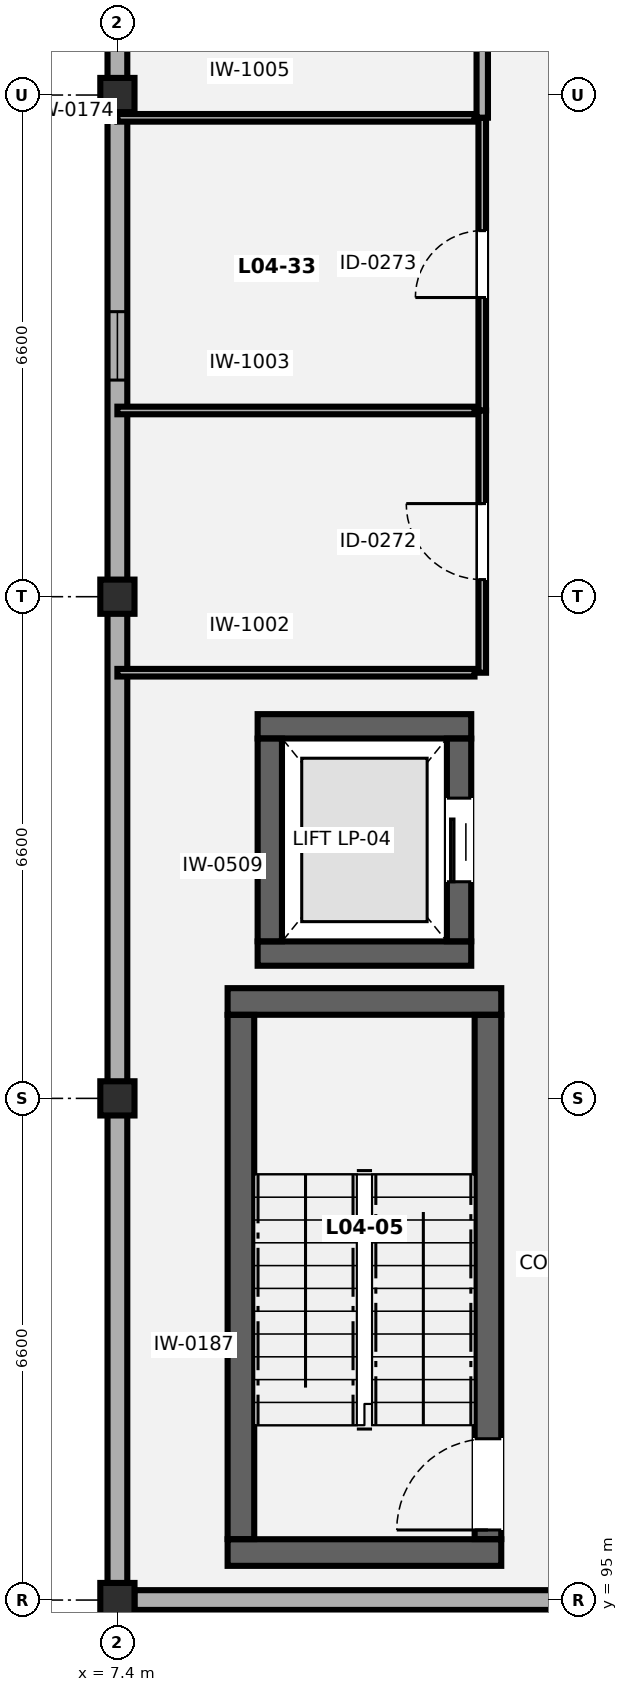
"""IFC4 building model, lengths in metres.
Left out: names, types, materials, properties, quantities, classifications, styles, units other than length and angle.
Written with IfcOpenShell. Run it as: python <this file> out.ifc"""

import sys

from ifc_helpers import new_model, si_unit, direction, frame, frame_2d, origin, origin_2d, place, context, subcontext, project, spatial, rectangle, extrude, element, fill, save


model = new_model("IFC4")
c1 = context("Model", 3, precision=1e-05, world=origin(), true_north=direction((0.0, 1.0)))
c2 = subcontext(c1, "Body", "Model", "MODEL_VIEW")
j1 = project(units=[si_unit("LENGTHUNIT", "METRE"), si_unit("PLANEANGLEUNIT", "RADIAN")], contexts=[c1])
p1 = place(None, origin())
s1 = spatial("IfcSite", under=j1, at=p1, CompositionType="ELEMENT")
p2 = place(p1, origin())
s2 = spatial("IfcBuilding", under=s1, at=p2, CompositionType="ELEMENT")
p3 = place(p2, frame((0.0, 0.0, 17.5)))
s3 = spatial("IfcBuildingStorey", under=s2, at=p3, CompositionType="ELEMENT", Elevation=17.5)
for number, where, z_axis, x_axis in (
    (1, (7.4, 95.0, 0.0), (0.0, 0.0, 1.0), (1.0, 0.0, 0.0)),
    (2, (7.4, 101.6, 0.0), (0.0, 0.0, 1.0), (1.0, 0.0, 0.0)),
    (3, (7.4, 108.2, 0.0), (0.0, 0.0, 1.0), (1.0, 0.0, 0.0)),
    (4, (7.4, 114.8, 0.0), (0.0, 0.0, 1.0), (1.0, 0.0, 0.0)),
):
    element("IfcColumn", number, at=place(p3, frame(where, z_axis=z_axis, x_axis=x_axis)), inside=s3, PredefinedType="PILASTER", context=c2, shape_type="SweptSolid", body=[
        extrude(rectangle(XDim=0.45, YDim=0.45, at=origin_2d()), origin(), (0.0, 0.0, 1.0), 4.2),
    ])
p4 = place(p3, frame((7.4, 95.223, 0.0), z_axis=(0.0, 0.0, 1.0), x_axis=(0.0, 1.0, 0.0)))
e5 = element("IfcWall", 5, at=p4, inside=s3, PredefinedType="SOLIDWALL", context=c2, shape_type="SweptSolid", body=[
    extrude(rectangle(XDim=52.354, YDim=0.26, at=frame_2d((26.177, 0.0))), origin(), (0.0, 0.0, 1.0), 2.885),
])
p5 = place(p4, frame((15.827, 0.0, 0.85)))
e6 = element("IfcOpeningElement", 6, at=p5, cuts=e5, PredefinedType="OPENING", context=c2, shape_type="SweptSolid", body=[
    extrude(rectangle(XDim=0.9, YDim=1.35, at=frame_2d((0.45, 0.675))), frame((0.0, 0.14, 0.0), z_axis=(0.0, -1.0, 0.0), x_axis=(1.0, 0.0, 0.0)), (0.0, 0.0, 1.0), 0.28),
])
p6 = place(p4, frame((29.027, 0.0, 0.85)))
e7 = element("IfcOpeningElement", 7, at=p6, cuts=e5, PredefinedType="OPENING", context=c2, shape_type="SweptSolid", body=[
    extrude(rectangle(XDim=0.9, YDim=1.35, at=frame_2d((0.45, 0.675))), frame((0.0, 0.14, 0.0), z_axis=(0.0, -1.0, 0.0), x_axis=(1.0, 0.0, 0.0)), (0.0, 0.0, 1.0), 0.28),
])
p7 = place(p4, frame((42.227, 0.0, 0.85)))
e8 = element("IfcOpeningElement", 8, at=p7, cuts=e5, PredefinedType="OPENING", context=c2, shape_type="SweptSolid", body=[
    extrude(rectangle(XDim=0.9, YDim=1.35, at=frame_2d((0.45, 0.675))), frame((0.0, 0.14, 0.0), z_axis=(0.0, -1.0, 0.0), x_axis=(1.0, 0.0, 0.0)), (0.0, 0.0, 1.0), 0.28),
])
p8 = place(p3, frame((26.977, 95.0, 0.0), z_axis=(0.0, 0.0, 1.0), x_axis=(-1.0, 0.0, 0.0)))
e9 = element("IfcWall", 9, at=p8, inside=s3, PredefinedType="SOLIDWALL", context=c2, shape_type="SweptSolid", body=[
    extrude(rectangle(XDim=19.354, YDim=0.26, at=frame_2d((9.677, 0.0))), origin(), (0.0, 0.0, 1.0), 2.48),
])
p9 = place(p8, frame((1.577, 0.0, 0.85)))
e10 = element("IfcOpeningElement", 10, at=p9, cuts=e9, PredefinedType="OPENING", context=c2, shape_type="SweptSolid", body=[
    extrude(rectangle(XDim=1.7, YDim=1.4, at=frame_2d((0.85, 0.7))), frame((0.0, 0.14, 0.0), z_axis=(0.0, -1.0, 0.0), x_axis=(1.0, 0.0, 0.0)), (0.0, 0.0, 1.0), 0.28),
])
for number, where, z_axis, x_axis in (
    (11, (8.85, 95.625, 0.0), (0.0, 0.0, 1.0), (1.0, 0.0, 0.0)),
    (12, (8.85, 102.875, 0.0), (0.0, 0.0, 1.0), (1.0, 0.0, 0.0)),
):
    element("IfcWall", number, at=place(p3, frame(where, z_axis=z_axis, x_axis=x_axis)), inside=s3, PredefinedType="SHEAR", context=c2, shape_type="SweptSolid", body=[
        extrude(rectangle(XDim=3.6, YDim=0.35, at=frame_2d((1.8, 0.0))), origin(), (0.0, 0.0, 1.0), 3.85),
    ])
p10 = place(p3, frame((9.025, 95.802, 0.0), z_axis=(0.0, 0.0, 1.0), x_axis=(0.0, 1.0, 0.0)))
e13 = element("IfcWall", 13, at=p10, inside=s3, PredefinedType="SHEAR", context=c2, shape_type="SweptSolid", body=[
    extrude(rectangle(XDim=6.896, YDim=0.35, at=frame_2d((3.448, 0.0))), origin(), (0.0, 0.0, 1.0), 3.85),
])
p11 = place(p3, frame((12.275, 95.802, 0.0), z_axis=(0.0, 0.0, 1.0), x_axis=(0.0, 1.0, 0.0)))
e14 = element("IfcWall", 14, at=p11, inside=s3, PredefinedType="SHEAR", context=c2, shape_type="SweptSolid", body=[
    extrude(rectangle(XDim=6.896, YDim=0.35, at=frame_2d((3.448, 0.0))), origin(), (0.0, 0.0, 1.0), 3.85),
])
p12 = place(p11, frame((0.12, 0.0, 0.0)))
e15 = element("IfcOpeningElement", 15, at=p12, cuts=e14, PredefinedType="OPENING", context=c2, shape_type="SweptSolid", body=[
    extrude(rectangle(XDim=1.2, YDim=2.15, at=frame_2d((0.6, 1.075))), frame((0.0, 0.185, 0.0), z_axis=(0.0, -1.0, 0.0), x_axis=(1.0, 0.0, 0.0)), (0.0, 0.0, 1.0), 0.37),
])
for number, where, z_axis, x_axis in (
    (16, (9.245, 103.505, 0.0), (0.0, 0.0, 1.0), (1.0, 0.0, 0.0)),
    (17, (9.245, 106.495, 0.0), (0.0, 0.0, 1.0), (1.0, 0.0, 0.0)),
):
    element("IfcWall", number, at=place(p3, frame(where, z_axis=z_axis, x_axis=x_axis)), inside=s3, PredefinedType="SHEAR", context=c2, shape_type="SweptSolid", body=[
        extrude(rectangle(XDim=2.81, YDim=0.32, at=frame_2d((1.405, 0.0))), origin(), (0.0, 0.0, 1.0), 3.85),
    ])
p13 = place(p3, frame((9.405, 103.667, 0.0), z_axis=(0.0, 0.0, 1.0), x_axis=(0.0, 1.0, 0.0)))
e18 = element("IfcWall", 18, at=p13, inside=s3, PredefinedType="SHEAR", context=c2, shape_type="SweptSolid", body=[
    extrude(rectangle(XDim=2.666, YDim=0.32, at=frame_2d((1.333, 0.0))), origin(), (0.0, 0.0, 1.0), 3.85),
])
p14 = place(p3, frame((11.895, 103.667, 0.0), z_axis=(0.0, 0.0, 1.0), x_axis=(0.0, 1.0, 0.0)))
e19 = element("IfcWall", 19, at=p14, inside=s3, PredefinedType="SHEAR", context=c2, shape_type="SweptSolid", body=[
    extrude(rectangle(XDim=2.666, YDim=0.32, at=frame_2d((1.333, 0.0))), origin(), (0.0, 0.0, 1.0), 3.85),
])
p15 = place(p14, frame((0.783, 0.0, 0.0)))
e20 = element("IfcOpeningElement", 20, at=p15, cuts=e19, PredefinedType="OPENING", context=c2, shape_type="SweptSolid", body=[
    extrude(rectangle(XDim=1.1, YDim=2.15, at=frame_2d((0.55, 1.075))), frame((0.0, 0.17, 0.0), z_axis=(0.0, -1.0, 0.0), x_axis=(1.0, 0.0, 0.0)), (0.0, 0.0, 1.0), 0.34),
])
for number, where, z_axis, x_axis in (
    (21, (7.4, 107.2, 0.0), (0.0, 0.0, 1.0), (1.0, 0.0, 0.0)),
    (22, (7.4, 110.65, 0.0), (0.0, 0.0, 1.0), (1.0, 0.0, 0.0)),
):
    element("IfcWall", number, at=place(p3, frame(where, z_axis=z_axis, x_axis=x_axis)), inside=s3, PredefinedType="PARTITIONING", context=c2, shape_type="SweptSolid", body=[
        extrude(rectangle(XDim=4.698, YDim=0.1, at=frame_2d((2.349, 0.0))), origin(), (0.0, 0.0, 1.0), 3.85),
    ])
p16 = place(p3, frame((12.2, 107.2, 0.0), z_axis=(0.0, 0.0, 1.0), x_axis=(0.0, 1.0, 0.0)))
e23 = element("IfcWall", 23, at=p16, inside=s3, PredefinedType="PARTITIONING", context=c2, shape_type="SweptSolid", body=[
    extrude(rectangle(XDim=3.45, YDim=0.1, at=frame_2d((1.725, 0.0))), origin(), (0.0, 0.0, 1.0), 3.85),
])
p17 = place(p16, frame((1.225, 0.0, 0.0)))
e24 = element("IfcOpeningElement", 24, at=p17, cuts=e23, PredefinedType="OPENING", context=c2, shape_type="SweptSolid", body=[
    extrude(rectangle(XDim=1.0, YDim=2.1, at=frame_2d((0.5, 1.05))), frame((0.0, 0.06, 0.0), z_axis=(0.0, -1.0, 0.0), x_axis=(1.0, 0.0, 0.0)), (0.0, 0.0, 1.0), 0.12),
])
p18 = place(p3, frame((7.4, 114.5, 0.0), z_axis=(0.0, 0.0, 1.0), x_axis=(1.0, 0.0, 0.0)))
e25 = element("IfcWall", 25, at=p18, inside=s3, PredefinedType="PARTITIONING", context=c2, shape_type="SweptSolid", body=[
    extrude(rectangle(XDim=4.698, YDim=0.1, at=frame_2d((2.349, 0.0))), origin(), (0.0, 0.0, 1.0), 2.435),
])
p19 = place(p3, frame((12.2, 110.652, 0.0), z_axis=(0.0, 0.0, 1.0), x_axis=(0.0, 1.0, 0.0)))
e26 = element("IfcWall", 26, at=p19, inside=s3, PredefinedType="PARTITIONING", context=c2, shape_type="SweptSolid", body=[
    extrude(rectangle(XDim=3.848, YDim=0.1, at=frame_2d((1.924, 0.0))), origin(), (0.0, 0.0, 1.0), 3.85),
])
p20 = place(p19, frame((1.484, 0.0, 0.0)))
e27 = element("IfcOpeningElement", 27, at=p20, cuts=e26, PredefinedType="OPENING", context=c2, shape_type="SweptSolid", body=[
    extrude(rectangle(XDim=0.88, YDim=2.08, at=frame_2d((0.44, 1.04))), frame((0.0, 0.06, 0.0), z_axis=(0.0, -1.0, 0.0), x_axis=(1.0, 0.0, 0.0)), (0.0, 0.0, 1.0), 0.12),
])
p21 = place(p3, frame((12.2, 114.502, 0.0), z_axis=(0.0, 0.0, 1.0), x_axis=(0.0, 1.0, 0.0)))
e28 = element("IfcWall", 28, at=p21, inside=s3, PredefinedType="PARTITIONING", context=c2, shape_type="SweptSolid", body=[
    extrude(rectangle(XDim=13.298, YDim=0.15, at=frame_2d((6.649, 0.0))), origin(), (0.0, 0.0, 1.0), 3.85),
])
p22 = place(p21, frame((5.649, 0.0, 0.0)))
e29 = element("IfcOpeningElement", 29, at=p22, cuts=e28, PredefinedType="OPENING", context=c2, shape_type="SweptSolid", body=[
    extrude(rectangle(XDim=1.3, YDim=2.2, at=frame_2d((0.65, 1.1))), frame((0.0, 0.085, 0.0), z_axis=(0.0, -1.0, 0.0), x_axis=(1.0, 0.0, 0.0)), (0.0, 0.0, 1.0), 0.17),
])
p23 = place(p5, origin())
e30 = element("IfcWindow", 30, at=p23, inside=s3, PartitioningType="SINGLE_PANEL", PredefinedType="WINDOW", context=c2, shape_type="SweptSolid", body=[
    extrude(rectangle(XDim=0.9, YDim=1.35, at=frame_2d((0.45, 0.675))), frame((0.0, 0.03, 0.0), z_axis=(0.0, -1.0, 0.0), x_axis=(1.0, 0.0, 0.0)), (0.0, 0.0, 1.0), 0.06),
])
fill(e6, e30)
p24 = place(p12, origin())
e31 = element("IfcDoor", 31, at=p24, inside=s3, OperationType="SINGLE_SWING_LEFT", PredefinedType="DOOR", context=c2, shape_type="SweptSolid", body=[
    extrude(rectangle(XDim=1.2, YDim=2.15, at=frame_2d((0.6, 1.075))), frame((0.0, 0.025, 0.0), z_axis=(0.0, -1.0, 0.0), x_axis=(1.0, 0.0, 0.0)), (0.0, 0.0, 1.0), 0.05),
])
fill(e15, e31)
p25 = place(p15, origin())
e32 = element("IfcDoor", 32, at=p25, inside=s3, OperationType="SLIDING_TO_LEFT", PredefinedType="DOOR", context=c2, shape_type="SweptSolid", body=[
    extrude(rectangle(XDim=1.1, YDim=2.15, at=frame_2d((0.55, 1.075))), frame((0.0, 0.025, 0.0), z_axis=(0.0, -1.0, 0.0), x_axis=(1.0, 0.0, 0.0)), (0.0, 0.0, 1.0), 0.05),
])
fill(e20, e32)
p26 = place(p17, origin())
e33 = element("IfcDoor", 33, at=p26, inside=s3, OperationType="SINGLE_SWING_RIGHT", PredefinedType="DOOR", context=c2, shape_type="SweptSolid", body=[
    extrude(rectangle(XDim=1.0, YDim=2.1, at=frame_2d((0.5, 1.05))), frame((0.0, 0.025, 0.0), z_axis=(0.0, -1.0, 0.0), x_axis=(1.0, 0.0, 0.0)), (0.0, 0.0, 1.0), 0.05),
])
fill(e24, e33)
p27 = place(p20, origin())
e34 = element("IfcDoor", 34, at=p27, inside=s3, OperationType="SINGLE_SWING_LEFT", PredefinedType="DOOR", context=c2, shape_type="SweptSolid", body=[
    extrude(rectangle(XDim=0.88, YDim=2.08, at=frame_2d((0.44, 1.04))), frame((0.0, 0.025, 0.0), z_axis=(0.0, -1.0, 0.0), x_axis=(1.0, 0.0, 0.0)), (0.0, 0.0, 1.0), 0.05),
])
fill(e27, e34)
save(model, sys.argv[1])
